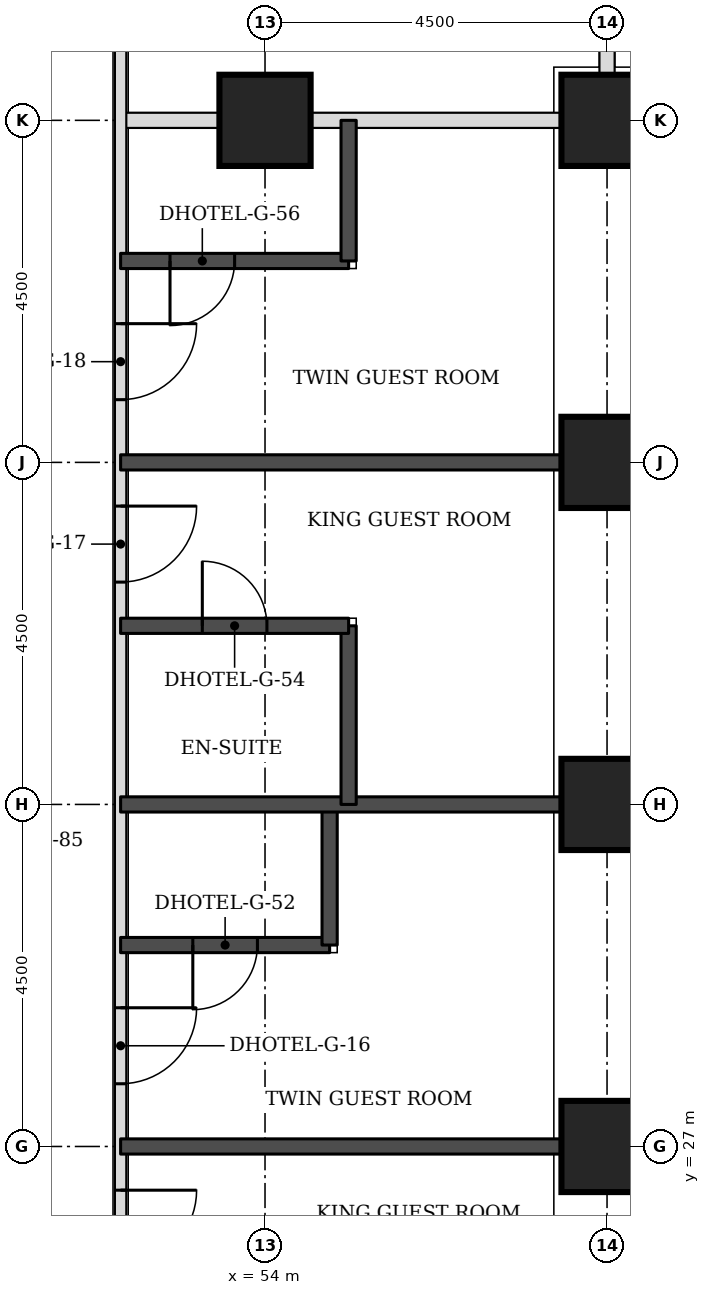
"""IFC4 building model, lengths in metres.
Left out: names, types, materials, properties, quantities, classifications, styles, units other than length and angle.
Written with IfcOpenShell. Run it as: python <this file> out.ifc"""

import sys

from ifc_helpers import new_model, si_unit, direction, frame, frame_2d, origin, origin_2d, place, context, subcontext, project, spatial, rectangle, extrude, element, fill, save


model = new_model("IFC4")
c1 = context("Model", 3, precision=1e-05, world=origin(), true_north=direction((0.0, 1.0)))
c2 = subcontext(c1, "Body", "Model", "MODEL_VIEW")
j1 = project(units=[si_unit("LENGTHUNIT", "METRE"), si_unit("PLANEANGLEUNIT", "RADIAN")], contexts=[c1])
p1 = place(None, origin())
s1 = spatial("IfcSite", under=j1, at=p1, CompositionType="ELEMENT")
p2 = place(p1, origin())
s2 = spatial("IfcBuilding", under=s1, at=p2, CompositionType="ELEMENT")
p3 = place(p2, frame((0.0, 0.0, 66.0)))
s3 = spatial("IfcBuildingStorey", under=s2, at=p3, CompositionType="ELEMENT", Elevation=66.0)
for number, where, z_axis, x_axis in (
    (1, (58.5, 27.0, 0.0), (0.0, 0.0, 1.0), (1.0, 0.0, 0.0)),
    (2, (58.5, 31.5, 0.0), (0.0, 0.0, 1.0), (1.0, 0.0, 0.0)),
    (3, (58.5, 36.0, 0.0), (0.0, 0.0, 1.0), (1.0, 0.0, 0.0)),
    (4, (54.0, 40.5, 0.0), (0.0, 0.0, 1.0), (1.0, 0.0, 0.0)),
    (5, (58.5, 40.5, 0.0), (0.0, 0.0, 1.0), (1.0, 0.0, 0.0)),
):
    element("IfcColumn", number, at=place(p3, frame(where, z_axis=z_axis, x_axis=x_axis)), inside=s3, PredefinedType="COLUMN", context=c2, shape_type="SweptSolid", body=[
        extrude(rectangle(XDim=1.2, YDim=1.2, at=origin_2d()), origin(), (0.0, 0.0, 1.0), 3.3),
    ])
p4 = place(p3, frame((52.1, 40.5, 0.0), z_axis=(0.0, 0.0, 1.0), x_axis=(1.0, 0.0, 0.0)))
e6 = element("IfcWall", 6, at=p4, inside=s3, PredefinedType="PARTITIONING", context=c2, shape_type="SweptSolid", body=[
    extrude(rectangle(XDim=5.8, YDim=0.2, at=frame_2d((2.9, 0.0))), origin(), (0.0, 0.0, 1.0), 2.33),
])
p5 = place(p3, frame((58.5, 41.1, 0.0), z_axis=(0.0, 0.0, 1.0), x_axis=(0.0, 1.0, 0.0)))
e7 = element("IfcWall", 7, at=p5, inside=s3, PredefinedType="PARTITIONING", context=c2, shape_type="SweptSolid", body=[
    extrude(rectangle(XDim=6.4, YDim=0.2, at=frame_2d((3.2, 0.0))), origin(), (0.0, 0.0, 1.0), 3.08),
])
p6 = place(p3, frame((52.1, 24.4, 0.0), z_axis=(0.0, 0.0, 1.0), x_axis=(0.0, 1.0, 0.0)))
e8 = element("IfcWall", 8, at=p6, inside=s3, PredefinedType="PARTITIONING", context=c2, shape_type="SweptSolid", body=[
    extrude(rectangle(XDim=23.1, YDim=0.15, at=frame_2d((11.55, 0.0))), origin(), (0.0, 0.0, 1.0), 3.08),
])
p7 = place(p6, frame((1.025, 0.0, 0.0)))
e9 = element("IfcOpeningElement", 9, at=p7, cuts=e8, PredefinedType="OPENING", context=c2, shape_type="SweptSolid", body=[
    extrude(rectangle(XDim=1.0, YDim=2.1, at=frame_2d((0.5, 1.05))), frame((0.0, 0.085, 0.0), z_axis=(0.0, -1.0, 0.0), x_axis=(1.0, 0.0, 0.0)), (0.0, 0.0, 1.0), 0.17),
])
p8 = place(p6, frame((3.425, 0.0, 0.0)))
e10 = element("IfcOpeningElement", 10, at=p8, cuts=e8, PredefinedType="OPENING", context=c2, shape_type="SweptSolid", body=[
    extrude(rectangle(XDim=1.0, YDim=2.1, at=frame_2d((0.5, 1.05))), frame((0.0, 0.085, 0.0), z_axis=(0.0, -1.0, 0.0), x_axis=(1.0, 0.0, 0.0)), (0.0, 0.0, 1.0), 0.17),
])
p9 = place(p6, frame((10.025, 0.0, 0.0)))
e11 = element("IfcOpeningElement", 11, at=p9, cuts=e8, PredefinedType="OPENING", context=c2, shape_type="SweptSolid", body=[
    extrude(rectangle(XDim=1.0, YDim=2.1, at=frame_2d((0.5, 1.05))), frame((0.0, 0.085, 0.0), z_axis=(0.0, -1.0, 0.0), x_axis=(1.0, 0.0, 0.0)), (0.0, 0.0, 1.0), 0.17),
])
p10 = place(p6, frame((12.425, 0.0, 0.0)))
e12 = element("IfcOpeningElement", 12, at=p10, cuts=e8, PredefinedType="OPENING", context=c2, shape_type="SweptSolid", body=[
    extrude(rectangle(XDim=1.0, YDim=2.1, at=frame_2d((0.5, 1.05))), frame((0.0, 0.085, 0.0), z_axis=(0.0, -1.0, 0.0), x_axis=(1.0, 0.0, 0.0)), (0.0, 0.0, 1.0), 0.17),
])
p11 = place(p6, frame((19.15, 0.0, 0.0)))
e13 = element("IfcOpeningElement", 13, at=p11, cuts=e8, PredefinedType="OPENING", context=c2, shape_type="SweptSolid", body=[
    extrude(rectangle(XDim=0.9, YDim=2.1, at=frame_2d((0.45, 1.05))), frame((0.0, 0.085, 0.0), z_axis=(0.0, -1.0, 0.0), x_axis=(1.0, 0.0, 0.0)), (0.0, 0.0, 1.0), 0.17),
])
p12 = place(p3, frame((52.1, 27.0, 0.0), z_axis=(0.0, 0.0, 1.0), x_axis=(1.0, 0.0, 0.0)))
e14 = element("IfcWall", 14, at=p12, inside=s3, PredefinedType="SOLIDWALL", context=c2, shape_type="SweptSolid", body=[
    extrude(rectangle(XDim=5.8, YDim=0.2, at=frame_2d((2.9, 0.0))), origin(), (0.0, 0.0, 1.0), 3.08),
])
p13 = place(p3, frame((52.1, 29.65, 0.0), z_axis=(0.0, 0.0, 1.0), x_axis=(1.0, 0.0, 0.0)))
e15 = element("IfcWall", 15, at=p13, inside=s3, PredefinedType="SOLIDWALL", context=c2, shape_type="SweptSolid", body=[
    extrude(rectangle(XDim=2.75, YDim=0.2, at=frame_2d((1.375, 0.0))), origin(), (0.0, 0.0, 1.0), 3.08),
])
p14 = place(p13, frame((0.95, 0.0, 0.0)))
e16 = element("IfcOpeningElement", 16, at=p14, cuts=e15, PredefinedType="OPENING", context=c2, shape_type="SweptSolid", body=[
    extrude(rectangle(XDim=0.85, YDim=2.1, at=frame_2d((0.425, 1.05))), frame((0.0, 0.11, 0.0), z_axis=(0.0, -1.0, 0.0), x_axis=(1.0, 0.0, 0.0)), (0.0, 0.0, 1.0), 0.22),
])
p15 = place(p3, frame((54.85, 29.65, 0.0), z_axis=(0.0, 0.0, 1.0), x_axis=(0.0, 1.0, 0.0)))
e17 = element("IfcWall", 17, at=p15, inside=s3, PredefinedType="SOLIDWALL", context=c2, shape_type="SweptSolid", body=[
    extrude(rectangle(XDim=1.85, YDim=0.2, at=frame_2d((0.925, 0.0))), origin(), (0.0, 0.0, 1.0), 3.08),
])
p16 = place(p3, frame((52.1, 31.5, 0.0), z_axis=(0.0, 0.0, 1.0), x_axis=(1.0, 0.0, 0.0)))
e18 = element("IfcWall", 18, at=p16, inside=s3, PredefinedType="SOLIDWALL", context=c2, shape_type="SweptSolid", body=[
    extrude(rectangle(XDim=5.8, YDim=0.2, at=frame_2d((2.9, 0.0))), origin(), (0.0, 0.0, 1.0), 3.08),
])
p17 = place(p3, frame((55.1, 31.5, 0.0), z_axis=(0.0, 0.0, 1.0), x_axis=(0.0, 1.0, 0.0)))
e19 = element("IfcWall", 19, at=p17, inside=s3, PredefinedType="SOLIDWALL", context=c2, shape_type="SweptSolid", body=[
    extrude(rectangle(XDim=2.35, YDim=0.2, at=frame_2d((1.175, 0.0))), origin(), (0.0, 0.0, 1.0), 3.08),
])
p18 = place(p3, frame((52.1, 33.85, 0.0), z_axis=(0.0, 0.0, 1.0), x_axis=(1.0, 0.0, 0.0)))
e20 = element("IfcWall", 20, at=p18, inside=s3, PredefinedType="SOLIDWALL", context=c2, shape_type="SweptSolid", body=[
    extrude(rectangle(XDim=3.0, YDim=0.2, at=frame_2d((1.5, 0.0))), origin(), (0.0, 0.0, 1.0), 3.08),
])
p19 = place(p18, frame((1.075, 0.0, 0.0)))
e21 = element("IfcOpeningElement", 21, at=p19, cuts=e20, PredefinedType="OPENING", context=c2, shape_type="SweptSolid", body=[
    extrude(rectangle(XDim=0.85, YDim=2.1, at=frame_2d((0.425, 1.05))), frame((0.0, 0.11, 0.0), z_axis=(0.0, -1.0, 0.0), x_axis=(1.0, 0.0, 0.0)), (0.0, 0.0, 1.0), 0.22),
])
p20 = place(p3, frame((52.1, 36.0, 0.0), z_axis=(0.0, 0.0, 1.0), x_axis=(1.0, 0.0, 0.0)))
e22 = element("IfcWall", 22, at=p20, inside=s3, PredefinedType="SOLIDWALL", context=c2, shape_type="SweptSolid", body=[
    extrude(rectangle(XDim=5.8, YDim=0.2, at=frame_2d((2.9, 0.0))), origin(), (0.0, 0.0, 1.0), 3.08),
])
p21 = place(p3, frame((52.1, 38.65, 0.0), z_axis=(0.0, 0.0, 1.0), x_axis=(1.0, 0.0, 0.0)))
e23 = element("IfcWall", 23, at=p21, inside=s3, PredefinedType="SOLIDWALL", context=c2, shape_type="SweptSolid", body=[
    extrude(rectangle(XDim=3.0, YDim=0.2, at=frame_2d((1.5, 0.0))), origin(), (0.0, 0.0, 1.0), 3.08),
])
p22 = place(p21, frame((0.65, 0.0, 0.0)))
e24 = element("IfcOpeningElement", 24, at=p22, cuts=e23, PredefinedType="OPENING", context=c2, shape_type="SweptSolid", body=[
    extrude(rectangle(XDim=0.85, YDim=2.1, at=frame_2d((0.425, 1.05))), frame((0.0, 0.11, 0.0), z_axis=(0.0, -1.0, 0.0), x_axis=(1.0, 0.0, 0.0)), (0.0, 0.0, 1.0), 0.22),
])
p23 = place(p3, frame((55.1, 38.65, 0.0), z_axis=(0.0, 0.0, 1.0), x_axis=(0.0, 1.0, 0.0)))
e25 = element("IfcWall", 25, at=p23, inside=s3, PredefinedType="SOLIDWALL", context=c2, shape_type="SweptSolid", body=[
    extrude(rectangle(XDim=1.85, YDim=0.2, at=frame_2d((0.925, 0.0))), origin(), (0.0, 0.0, 1.0), 3.08),
])
p24 = place(p7, frame((1.0, 0.0, 0.0), z_axis=(0.0, 0.0, 1.0), x_axis=(-1.0, 0.0, 0.0)))
e26 = element("IfcDoor", 26, at=p24, inside=s3, OperationType="SINGLE_SWING_LEFT", PredefinedType="DOOR", context=c2, shape_type="SweptSolid", body=[
    extrude(rectangle(XDim=1.0, YDim=2.1, at=frame_2d((0.5, 1.05))), frame((0.0, 0.025, 0.0), z_axis=(0.0, -1.0, 0.0), x_axis=(1.0, 0.0, 0.0)), (0.0, 0.0, 1.0), 0.05),
])
fill(e9, e26)
p25 = place(p8, frame((1.0, 0.0, 0.0), z_axis=(0.0, 0.0, 1.0), x_axis=(-1.0, 0.0, 0.0)))
e27 = element("IfcDoor", 27, at=p25, inside=s3, OperationType="SINGLE_SWING_LEFT", PredefinedType="DOOR", context=c2, shape_type="SweptSolid", body=[
    extrude(rectangle(XDim=1.0, YDim=2.1, at=frame_2d((0.5, 1.05))), frame((0.0, 0.025, 0.0), z_axis=(0.0, -1.0, 0.0), x_axis=(1.0, 0.0, 0.0)), (0.0, 0.0, 1.0), 0.05),
])
fill(e10, e27)
p26 = place(p14, frame((0.85, 0.0, 0.0), z_axis=(0.0, 0.0, 1.0), x_axis=(-1.0, 0.0, 0.0)))
e28 = element("IfcDoor", 28, at=p26, inside=s3, OperationType="SINGLE_SWING_RIGHT", PredefinedType="DOOR", context=c2, shape_type="SweptSolid", body=[
    extrude(rectangle(XDim=0.85, YDim=2.1, at=frame_2d((0.425, 1.05))), frame((0.0, 0.025, 0.0), z_axis=(0.0, -1.0, 0.0), x_axis=(1.0, 0.0, 0.0)), (0.0, 0.0, 1.0), 0.05),
])
fill(e16, e28)
p27 = place(p9, frame((1.0, 0.0, 0.0), z_axis=(0.0, 0.0, 1.0), x_axis=(-1.0, 0.0, 0.0)))
e29 = element("IfcDoor", 29, at=p27, inside=s3, OperationType="SINGLE_SWING_LEFT", PredefinedType="DOOR", context=c2, shape_type="SweptSolid", body=[
    extrude(rectangle(XDim=1.0, YDim=2.1, at=frame_2d((0.5, 1.05))), frame((0.0, 0.025, 0.0), z_axis=(0.0, -1.0, 0.0), x_axis=(1.0, 0.0, 0.0)), (0.0, 0.0, 1.0), 0.05),
])
fill(e11, e29)
p28 = place(p19, origin())
e30 = element("IfcDoor", 30, at=p28, inside=s3, OperationType="SINGLE_SWING_LEFT", PredefinedType="DOOR", context=c2, shape_type="SweptSolid", body=[
    extrude(rectangle(XDim=0.85, YDim=2.1, at=frame_2d((0.425, 1.05))), frame((0.0, 0.025, 0.0), z_axis=(0.0, -1.0, 0.0), x_axis=(1.0, 0.0, 0.0)), (0.0, 0.0, 1.0), 0.05),
])
fill(e21, e30)
p29 = place(p10, frame((1.0, 0.0, 0.0), z_axis=(0.0, 0.0, 1.0), x_axis=(-1.0, 0.0, 0.0)))
e31 = element("IfcDoor", 31, at=p29, inside=s3, OperationType="SINGLE_SWING_LEFT", PredefinedType="DOOR", context=c2, shape_type="SweptSolid", body=[
    extrude(rectangle(XDim=1.0, YDim=2.1, at=frame_2d((0.5, 1.05))), frame((0.0, 0.025, 0.0), z_axis=(0.0, -1.0, 0.0), x_axis=(1.0, 0.0, 0.0)), (0.0, 0.0, 1.0), 0.05),
])
fill(e12, e31)
p30 = place(p22, frame((0.85, 0.0, 0.0), z_axis=(0.0, 0.0, 1.0), x_axis=(-1.0, 0.0, 0.0)))
e32 = element("IfcDoor", 32, at=p30, inside=s3, OperationType="SINGLE_SWING_RIGHT", PredefinedType="DOOR", context=c2, shape_type="SweptSolid", body=[
    extrude(rectangle(XDim=0.85, YDim=2.1, at=frame_2d((0.425, 1.05))), frame((0.0, 0.025, 0.0), z_axis=(0.0, -1.0, 0.0), x_axis=(1.0, 0.0, 0.0)), (0.0, 0.0, 1.0), 0.05),
])
fill(e24, e32)
save(model, sys.argv[1])
